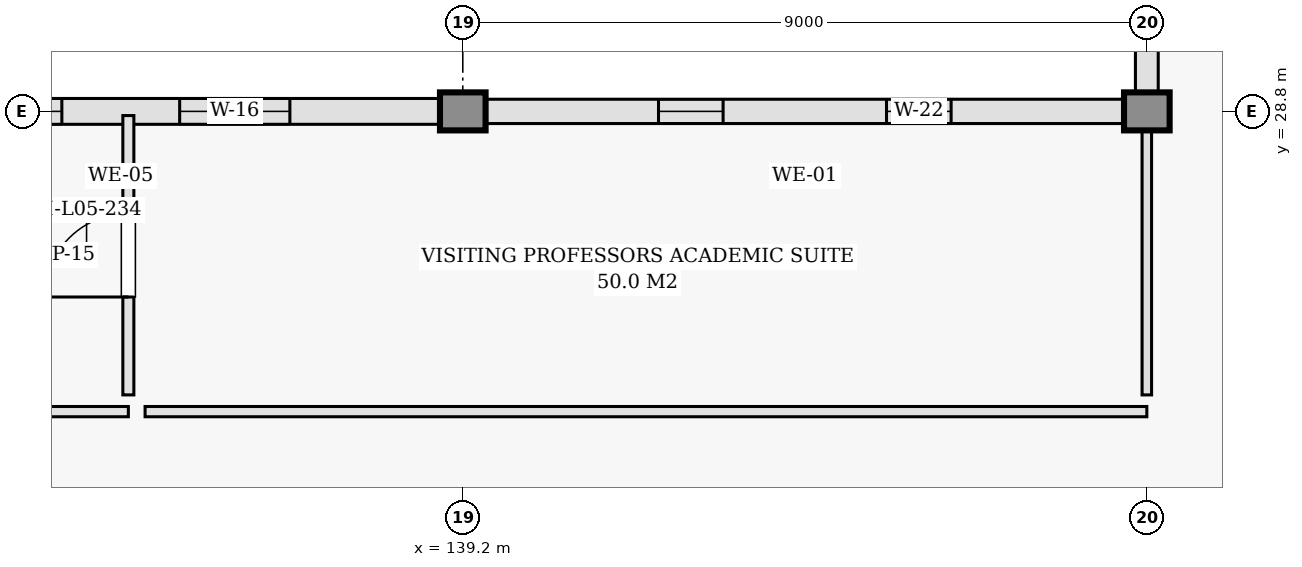
"""IFC4 building model, lengths in metres.
Left out: names, types, materials, properties, quantities, classifications, styles, units other than length and angle.
Written with IfcOpenShell. Run it as: python <this file> out.ifc"""

import sys

from ifc_helpers import new_model, si_unit, direction, frame, frame_2d, origin, origin_2d, place, context, subcontext, project, spatial, rectangle, extrude, element, fill, save


model = new_model("IFC4")
c1 = context("Model", 3, precision=1e-05, world=origin(), true_north=direction((0.0, 1.0)))
c2 = subcontext(c1, "Body", "Model", "MODEL_VIEW")
j1 = project(units=[si_unit("LENGTHUNIT", "METRE"), si_unit("PLANEANGLEUNIT", "RADIAN")], contexts=[c1])
p1 = place(None, origin())
s1 = spatial("IfcSite", under=j1, at=p1, CompositionType="ELEMENT")
p2 = place(p1, origin())
s2 = spatial("IfcBuilding", under=s1, at=p2, CompositionType="ELEMENT")
p3 = place(p2, frame((0.0, 0.0, 22.2)))
s3 = spatial("IfcBuildingStorey", under=s2, at=p3, CompositionType="ELEMENT", Elevation=22.2)
for number, where, z_axis, x_axis in (
    (1, (139.2, 28.8, 0.0), (0.0, 0.0, 1.0), (1.0, 0.0, 0.0)),
    (2, (148.2, 28.8, 0.0), (0.0, 0.0, 1.0), (1.0, 0.0, 0.0)),
):
    element("IfcColumn", number, at=place(p3, frame(where, z_axis=z_axis, x_axis=x_axis)), inside=s3, PredefinedType="COLUMN", context=c2, shape_type="SweptSolid", body=[
        extrude(rectangle(XDim=0.5, YDim=0.5, at=origin_2d()), origin(), (0.0, 0.0, 1.0), 4.2),
    ])
p4 = place(p3, frame((148.2, 36.0, 0.0), z_axis=(0.0, 0.0, 1.0), x_axis=(0.0, -1.0, 0.0)))
e3 = element("IfcWall", 3, at=p4, inside=s3, PredefinedType="SOLIDWALL", context=c2, shape_type="SweptSolid", body=[
    extrude(rectangle(XDim=7.2, YDim=0.3, at=frame_2d((3.6, 0.0))), origin(), (0.0, 0.0, 1.0), 3.165),
])
p5 = place(p4, frame((1.875, 0.0, 0.9)))
e4 = element("IfcOpeningElement", 4, at=p5, cuts=e3, PredefinedType="OPENING", context=c2, shape_type="SweptSolid", body=[
    extrude(rectangle(XDim=1.05, YDim=1.4, at=frame_2d((0.525, 0.7))), frame((0.0, 0.16, 0.0), z_axis=(0.0, -1.0, 0.0), x_axis=(1.0, 0.0, 0.0)), (0.0, 0.0, 1.0), 0.32),
])
p6 = place(p4, frame((4.275, 0.0, 0.9)))
e5 = element("IfcOpeningElement", 5, at=p6, cuts=e3, PredefinedType="OPENING", context=c2, shape_type="SweptSolid", body=[
    extrude(rectangle(XDim=1.05, YDim=1.4, at=frame_2d((0.525, 0.7))), frame((0.0, 0.16, 0.0), z_axis=(0.0, -1.0, 0.0), x_axis=(1.0, 0.0, 0.0)), (0.0, 0.0, 1.0), 0.32),
])
p7 = place(p3, frame((148.2, 28.8, 0.0), z_axis=(0.0, 0.0, 1.0), x_axis=(-1.0, 0.0, 0.0)))
e6 = element("IfcWall", 6, at=p7, inside=s3, PredefinedType="SOLIDWALL", context=c2, shape_type="SweptSolid", body=[
    extrude(rectangle(XDim=9.0, YDim=0.32, at=frame_2d((4.5, 0.0))), origin(), (0.0, 0.0, 1.0), 3.165),
])
p8 = place(p7, frame((2.575, 0.0, 0.9)))
e7 = element("IfcOpeningElement", 7, at=p8, cuts=e6, PredefinedType="OPENING", context=c2, shape_type="SweptSolid", body=[
    extrude(rectangle(XDim=0.85, YDim=1.3, at=frame_2d((0.425, 0.65))), frame((0.0, 0.17, 0.0), z_axis=(0.0, -1.0, 0.0), x_axis=(1.0, 0.0, 0.0)), (0.0, 0.0, 1.0), 0.34),
])
p9 = place(p7, frame((5.575, 0.0, 0.9)))
e8 = element("IfcOpeningElement", 8, at=p9, cuts=e6, PredefinedType="OPENING", context=c2, shape_type="SweptSolid", body=[
    extrude(rectangle(XDim=0.85, YDim=1.3, at=frame_2d((0.425, 0.65))), frame((0.0, 0.17, 0.0), z_axis=(0.0, -1.0, 0.0), x_axis=(1.0, 0.0, 0.0)), (0.0, 0.0, 1.0), 0.34),
])
p10 = place(p3, frame((139.2, 28.8, 0.0), z_axis=(0.0, 0.0, 1.0), x_axis=(-1.0, 0.0, 0.0)))
e9 = element("IfcWall", 9, at=p10, inside=s3, PredefinedType="SOLIDWALL", context=c2, shape_type="SweptSolid", body=[
    extrude(rectangle(XDim=9.0, YDim=0.34, at=frame_2d((4.5, 0.0))), origin(), (0.0, 0.0, 1.0), 3.165),
])
p11 = place(p10, frame((2.275, 0.0, 0.9)))
e10 = element("IfcOpeningElement", 10, at=p11, cuts=e9, PredefinedType="OPENING", context=c2, shape_type="SweptSolid", body=[
    extrude(rectangle(XDim=1.45, YDim=1.6, at=frame_2d((0.725, 0.8))), frame((0.0, 0.18, 0.0), z_axis=(0.0, -1.0, 0.0), x_axis=(1.0, 0.0, 0.0)), (0.0, 0.0, 1.0), 0.36),
])
p12 = place(p10, frame((5.275, 0.0, 0.9)))
e11 = element("IfcOpeningElement", 11, at=p12, cuts=e9, PredefinedType="OPENING", context=c2, shape_type="SweptSolid", body=[
    extrude(rectangle(XDim=1.45, YDim=1.6, at=frame_2d((0.725, 0.8))), frame((0.0, 0.18, 0.0), z_axis=(0.0, -1.0, 0.0), x_axis=(1.0, 0.0, 0.0)), (0.0, 0.0, 1.0), 0.36),
])
p13 = place(p3, frame((121.6, 24.85, 0.0), z_axis=(0.0, 0.0, 1.0), x_axis=(1.0, 0.0, 0.0)))
e12 = element("IfcWall", 12, at=p13, inside=s3, PredefinedType="PARTITIONING", context=c2, shape_type="SweptSolid", body=[
    extrude(rectangle(XDim=13.2, YDim=0.135, at=frame_2d((6.6, 0.0))), origin(), (0.0, 0.0, 1.0), 3.98),
])
p14 = place(p13, frame((6.05, 0.0, 0.0)))
e13 = element("IfcOpeningElement", 13, at=p14, cuts=e12, PredefinedType="OPENING", context=c2, shape_type="SweptSolid", body=[
    extrude(rectangle(XDim=1.1, YDim=2.15, at=frame_2d((0.55, 1.075))), frame((0.0, 0.078, 0.0), z_axis=(0.0, -1.0, 0.0), x_axis=(1.0, 0.0, 0.0)), (0.0, 0.0, 1.0), 0.155),
])
p15 = place(p3, frame((134.8, 25.07, 0.0), z_axis=(0.0, 0.0, 1.0), x_axis=(0.0, 1.0, 0.0)))
e14 = element("IfcWall", 14, at=p15, inside=s3, PredefinedType="PARTITIONING", context=c2, shape_type="SweptSolid", body=[
    extrude(rectangle(XDim=3.675, YDim=0.145, at=frame_2d((1.837, 0.0))), origin(), (0.0, 0.0, 1.0), 3.165),
])
p16 = place(p15, frame((1.288, 0.0, 0.0)))
e15 = element("IfcOpeningElement", 15, at=p16, cuts=e14, PredefinedType="OPENING", context=c2, shape_type="SweptSolid", body=[
    extrude(rectangle(XDim=1.1, YDim=2.15, at=frame_2d((0.55, 1.075))), frame((0.0, 0.083, 0.0), z_axis=(0.0, -1.0, 0.0), x_axis=(1.0, 0.0, 0.0)), (0.0, 0.0, 1.0), 0.165),
])
p17 = place(p3, frame((135.02, 24.85, 0.0), z_axis=(0.0, 0.0, 1.0), x_axis=(1.0, 0.0, 0.0)))
e16 = element("IfcWall", 16, at=p17, inside=s3, PredefinedType="PARTITIONING", context=c2, shape_type="SweptSolid", body=[
    extrude(rectangle(XDim=13.18, YDim=0.135, at=frame_2d((6.59, 0.0))), origin(), (0.0, 0.0, 1.0), 3.315),
])
p18 = place(p3, frame((148.2, 25.07, 0.0), z_axis=(0.0, 0.0, 1.0), x_axis=(0.0, 1.0, 0.0)))
e17 = element("IfcWall", 17, at=p18, inside=s3, PredefinedType="PARTITIONING", context=c2, shape_type="SweptSolid", body=[
    extrude(rectangle(XDim=3.49, YDim=0.125, at=frame_2d((1.745, 0.0))), origin(), (0.0, 0.0, 1.0), 3.315),
])
p19 = place(p8, origin())
e18 = element("IfcWindow", 18, at=p19, inside=s3, PartitioningType="DOUBLE_PANEL_VERTICAL", PredefinedType="WINDOW", context=c2, shape_type="SweptSolid", body=[
    extrude(rectangle(XDim=0.85, YDim=1.3, at=frame_2d((0.425, 0.65))), frame((0.0, 0.03, 0.0), z_axis=(0.0, -1.0, 0.0), x_axis=(1.0, 0.0, 0.0)), (0.0, 0.0, 1.0), 0.06),
])
fill(e7, e18)
p20 = place(p9, origin())
e19 = element("IfcWindow", 19, at=p20, inside=s3, PartitioningType="DOUBLE_PANEL_VERTICAL", PredefinedType="WINDOW", context=c2, shape_type="SweptSolid", body=[
    extrude(rectangle(XDim=0.85, YDim=1.3, at=frame_2d((0.425, 0.65))), frame((0.0, 0.03, 0.0), z_axis=(0.0, -1.0, 0.0), x_axis=(1.0, 0.0, 0.0)), (0.0, 0.0, 1.0), 0.06),
])
fill(e8, e19)
p21 = place(p11, origin())
e20 = element("IfcWindow", 20, at=p21, inside=s3, PartitioningType="DOUBLE_PANEL_VERTICAL", PredefinedType="WINDOW", context=c2, shape_type="SweptSolid", body=[
    extrude(rectangle(XDim=1.45, YDim=1.6, at=frame_2d((0.725, 0.8))), frame((0.0, 0.03, 0.0), z_axis=(0.0, -1.0, 0.0), x_axis=(1.0, 0.0, 0.0)), (0.0, 0.0, 1.0), 0.06),
])
fill(e10, e20)
p22 = place(p12, origin())
e21 = element("IfcWindow", 21, at=p22, inside=s3, PartitioningType="DOUBLE_PANEL_VERTICAL", PredefinedType="WINDOW", context=c2, shape_type="SweptSolid", body=[
    extrude(rectangle(XDim=1.45, YDim=1.6, at=frame_2d((0.725, 0.8))), frame((0.0, 0.03, 0.0), z_axis=(0.0, -1.0, 0.0), x_axis=(1.0, 0.0, 0.0)), (0.0, 0.0, 1.0), 0.06),
])
fill(e11, e21)
p23 = place(p16, origin())
e22 = element("IfcDoor", 22, at=p23, inside=s3, OperationType="SINGLE_SWING_LEFT", PredefinedType="DOOR", context=c2, shape_type="SweptSolid", body=[
    extrude(rectangle(XDim=1.1, YDim=2.15, at=frame_2d((0.55, 1.075))), frame((0.0, 0.025, 0.0), z_axis=(0.0, -1.0, 0.0), x_axis=(1.0, 0.0, 0.0)), (0.0, 0.0, 1.0), 0.05),
])
fill(e15, e22)
save(model, sys.argv[1])
